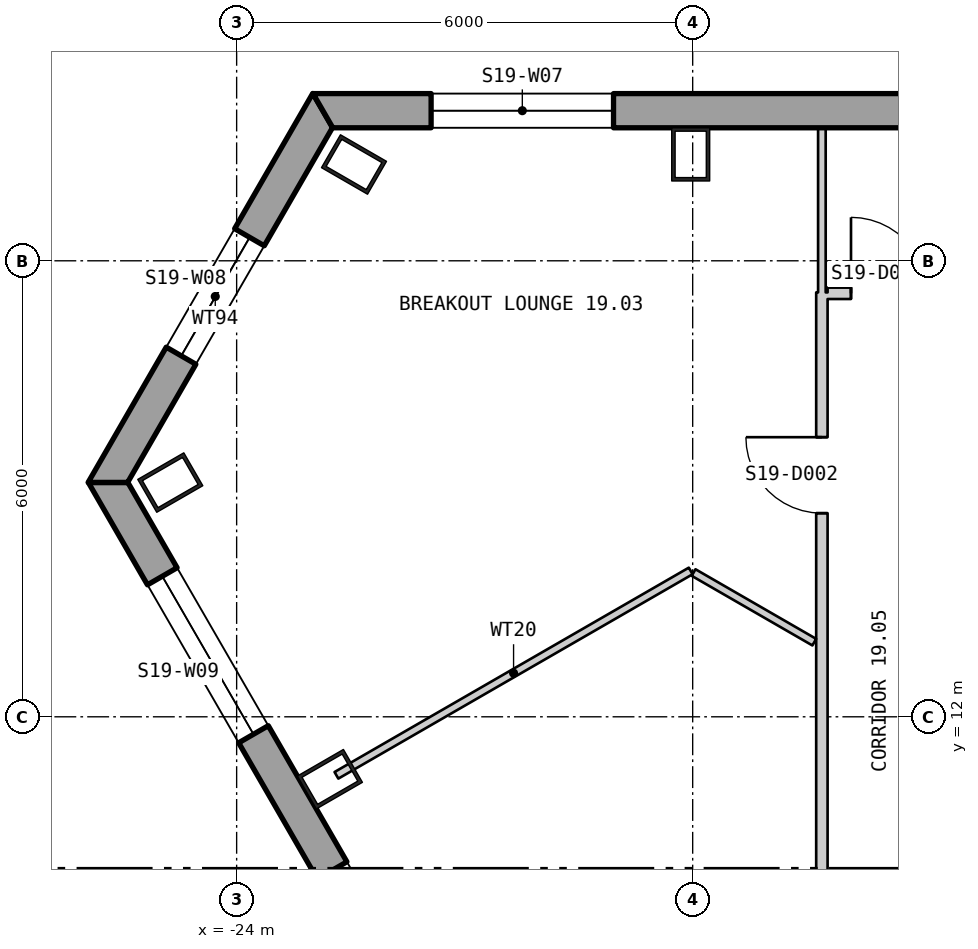
"""IFC4 building model, lengths in metres.
Left out: names, types, materials, properties, quantities, classifications, styles, units other than length and angle.
Written with IfcOpenShell. Run it as: python <this file> out.ifc"""

import sys

from ifc_helpers import new_model, si_unit, direction, frame, frame_2d, origin, origin_2d, place, context, subcontext, project, spatial, polyline, rectangle, hollow_rectangle, outline, extrude, element, fill, save


model = new_model("IFC4")
c1 = context("Model", 3, precision=1e-05, world=origin(), true_north=direction((0.0, 1.0)))
c2 = subcontext(c1, "Body", "Model", "MODEL_VIEW")
j1 = project(units=[si_unit("LENGTHUNIT", "METRE"), si_unit("PLANEANGLEUNIT", "RADIAN")], contexts=[c1])
p1 = place(None, origin())
s1 = spatial("IfcSite", under=j1, at=p1, CompositionType="ELEMENT")
p2 = place(p1, origin())
s2 = spatial("IfcBuilding", under=s1, at=p2, CompositionType="ELEMENT")
p3 = place(p2, frame((0.0, 0.0, 257.1)))
s3 = spatial("IfcBuildingStorey", under=s2, at=p3, CompositionType="ELEMENT", Elevation=257.1)
for number, where, z_axis, x_axis in (
    (1, (-18.026, 19.4, 0.0), (0.0, 0.0, 1.0), (-1.0, 0.0, 0.0)),
    (2, (-22.456, 19.267, 0.0), (0.0, 0.0, 1.0), (-0.5, -0.866, 0.0)),
    (3, (-24.873, 15.082, 0.0), (0.0, 0.0, 1.0), (0.5, -0.866, 0.0)),
    (4, (-22.773, 11.179, 0.0), (0.0, 0.0, 1.0), (0.5, -0.866, 0.0)),
):
    element("IfcColumn", number, at=place(p3, frame(where, z_axis=z_axis, x_axis=x_axis)), inside=s3, PredefinedType="COLUMN", context=c2, shape_type="SweptSolid", body=[
        extrude(hollow_rectangle(XDim=0.5, YDim=0.7, WallThickness=0.045, at=origin_2d()), origin(), (0.0, 0.0, 1.0), 3.9),
    ])
p4 = place(p3, frame((22.865, 19.975, -0.4), z_axis=(0.0, 0.0, 1.0), x_axis=(-1.0, 0.0, 0.0)))
e5 = element("IfcWall", 5, at=p4, inside=s3, PredefinedType="SOLIDWALL", context=c2, shape_type="SweptSolid", body=[
    extrude(outline(polyline([(-0.13, -0.225), (45.86, -0.225), (45.6, 0.225), (0.13, 0.225), (-0.13, -0.225)])), origin(), (0.0, 0.0, 1.0), 3.9),
])
p5 = place(p4, frame((1.424, 0.0, 1.3)))
e6 = element("IfcOpeningElement", 6, at=p5, cuts=e5, PredefinedType="OPENING", context=c2, shape_type="SweptSolid", body=[
    extrude(rectangle(XDim=2.4, YDim=2.0, at=frame_2d((1.2, 1.0))), frame((0.0, 0.235, 0.0), z_axis=(0.0, -1.0, 0.0), x_axis=(1.0, 0.0, 0.0)), (0.0, 0.0, 1.0), 0.47),
])
p6 = place(p4, frame((14.905, 0.0, 1.3)))
e7 = element("IfcOpeningElement", 7, at=p6, cuts=e5, PredefinedType="OPENING", context=c2, shape_type="SweptSolid", body=[
    extrude(rectangle(XDim=2.4, YDim=2.0, at=frame_2d((1.2, 1.0))), frame((0.0, 0.235, 0.0), z_axis=(0.0, -1.0, 0.0), x_axis=(1.0, 0.0, 0.0)), (0.0, 0.0, 1.0), 0.47),
])
p7 = place(p4, frame((19.412, 0.0, 1.3)))
e8 = element("IfcOpeningElement", 8, at=p7, cuts=e5, PredefinedType="OPENING", context=c2, shape_type="SweptSolid", body=[
    extrude(rectangle(XDim=2.4, YDim=2.0, at=frame_2d((1.2, 1.0))), frame((0.0, 0.235, 0.0), z_axis=(0.0, -1.0, 0.0), x_axis=(1.0, 0.0, 0.0)), (0.0, 0.0, 1.0), 0.47),
])
p8 = place(p4, frame((23.918, 0.0, 1.3)))
e9 = element("IfcOpeningElement", 9, at=p8, cuts=e5, PredefinedType="OPENING", context=c2, shape_type="SweptSolid", body=[
    extrude(rectangle(XDim=2.4, YDim=2.0, at=frame_2d((1.2, 1.0))), frame((0.0, 0.235, 0.0), z_axis=(0.0, -1.0, 0.0), x_axis=(1.0, 0.0, 0.0)), (0.0, 0.0, 1.0), 0.47),
])
p9 = place(p4, frame((28.425, 0.0, 1.3)))
e10 = element("IfcOpeningElement", 10, at=p9, cuts=e5, PredefinedType="OPENING", context=c2, shape_type="SweptSolid", body=[
    extrude(rectangle(XDim=2.4, YDim=2.0, at=frame_2d((1.2, 1.0))), frame((0.0, 0.235, 0.0), z_axis=(0.0, -1.0, 0.0), x_axis=(1.0, 0.0, 0.0)), (0.0, 0.0, 1.0), 0.47),
])
p10 = place(p4, frame((32.932, 0.0, 1.3)))
e11 = element("IfcOpeningElement", 11, at=p10, cuts=e5, PredefinedType="OPENING", context=c2, shape_type="SweptSolid", body=[
    extrude(rectangle(XDim=2.4, YDim=2.0, at=frame_2d((1.2, 1.0))), frame((0.0, 0.235, 0.0), z_axis=(0.0, -1.0, 0.0), x_axis=(1.0, 0.0, 0.0)), (0.0, 0.0, 1.0), 0.47),
])
p11 = place(p4, frame((41.907, 0.0, 1.3)))
e12 = element("IfcOpeningElement", 12, at=p11, cuts=e5, PredefinedType="OPENING", context=c2, shape_type="SweptSolid", body=[
    extrude(rectangle(XDim=2.4, YDim=2.0, at=frame_2d((1.2, 1.0))), frame((0.0, 0.235, 0.0), z_axis=(0.0, -1.0, 0.0), x_axis=(1.0, 0.0, 0.0)), (0.0, 0.0, 1.0), 0.47),
])
p12 = place(p3, frame((-22.869, 19.977, -0.4), z_axis=(0.0, 0.0, 1.0), x_axis=(-0.50000128263, -0.866024663256, 0.0)))
e13 = element("IfcWall", 13, at=p12, inside=s3, PredefinedType="SOLIDWALL", context=c2, shape_type="SweptSolid", body=[
    extrude(outline(polyline([(-0.13, -0.225), (5.78, -0.225), (5.52, 0.225), (0.13, 0.225), (-0.13, -0.225)])), origin(), (0.0, 0.0, 1.0), 3.9),
])
p13 = place(p12, frame((1.925, 0.0, 1.3)))
e14 = element("IfcOpeningElement", 14, at=p13, cuts=e13, PredefinedType="OPENING", context=c2, shape_type="SweptSolid", body=[
    extrude(rectangle(XDim=1.8, YDim=2.0, at=frame_2d((0.9, 1.0))), frame((0.0, 0.235, 0.0), z_axis=(0.0, -1.0, 0.0), x_axis=(1.0, 0.0, 0.0)), (0.0, 0.0, 1.0), 0.47),
])
p14 = place(p3, frame((-25.69, 15.082, -0.18), z_axis=(0.0, 0.0, 1.0), x_axis=(0.500000141277, -0.866025322218, 0.0)))
e15 = element("IfcWall", 15, at=p14, inside=s3, PredefinedType="SOLIDWALL", context=c2, shape_type="SweptSolid", body=[
    extrude(outline(polyline([(-0.13, -0.225), (45.86, -0.225), (45.6, 0.225), (0.13, 0.225), (-0.13, -0.225)])), origin(), (0.0, 0.0, 1.0), 3.68),
])
p15 = place(p14, frame((1.424, 0.0, 1.08)))
e16 = element("IfcOpeningElement", 16, at=p15, cuts=e15, PredefinedType="OPENING", context=c2, shape_type="SweptSolid", body=[
    extrude(rectangle(XDim=2.4, YDim=2.0, at=frame_2d((1.2, 1.0))), frame((0.0, 0.235, 0.0), z_axis=(0.0, -1.0, 0.0), x_axis=(1.0, 0.0, 0.0)), (0.0, 0.0, 1.0), 0.47),
])
p16 = place(p14, frame((5.892, 0.0, 1.08)))
e17 = element("IfcOpeningElement", 17, at=p16, cuts=e15, PredefinedType="OPENING", context=c2, shape_type="SweptSolid", body=[
    extrude(rectangle(XDim=2.4, YDim=2.0, at=frame_2d((1.2, 1.0))), frame((0.0, 0.235, 0.0), z_axis=(0.0, -1.0, 0.0), x_axis=(1.0, 0.0, 0.0)), (0.0, 0.0, 1.0), 0.47),
])
p17 = place(p14, frame((10.399, 0.0, 1.08)))
e18 = element("IfcOpeningElement", 18, at=p17, cuts=e15, PredefinedType="OPENING", context=c2, shape_type="SweptSolid", body=[
    extrude(rectangle(XDim=2.4, YDim=2.0, at=frame_2d((1.2, 1.0))), frame((0.0, 0.235, 0.0), z_axis=(0.0, -1.0, 0.0), x_axis=(1.0, 0.0, 0.0)), (0.0, 0.0, 1.0), 0.47),
])
p18 = place(p14, frame((14.905, 0.0, 1.08)))
e19 = element("IfcOpeningElement", 19, at=p18, cuts=e15, PredefinedType="OPENING", context=c2, shape_type="SweptSolid", body=[
    extrude(rectangle(XDim=2.4, YDim=2.0, at=frame_2d((1.2, 1.0))), frame((0.0, 0.235, 0.0), z_axis=(0.0, -1.0, 0.0), x_axis=(1.0, 0.0, 0.0)), (0.0, 0.0, 1.0), 0.47),
])
p19 = place(p14, frame((19.412, 0.0, 1.08)))
e20 = element("IfcOpeningElement", 20, at=p19, cuts=e15, PredefinedType="OPENING", context=c2, shape_type="SweptSolid", body=[
    extrude(rectangle(XDim=2.4, YDim=2.0, at=frame_2d((1.2, 1.0))), frame((0.0, 0.235, 0.0), z_axis=(0.0, -1.0, 0.0), x_axis=(1.0, 0.0, 0.0)), (0.0, 0.0, 1.0), 0.47),
])
p20 = place(p14, frame((23.918, 0.0, 1.08)))
e21 = element("IfcOpeningElement", 21, at=p20, cuts=e15, PredefinedType="OPENING", context=c2, shape_type="SweptSolid", body=[
    extrude(rectangle(XDim=2.4, YDim=2.0, at=frame_2d((1.2, 1.0))), frame((0.0, 0.235, 0.0), z_axis=(0.0, -1.0, 0.0), x_axis=(1.0, 0.0, 0.0)), (0.0, 0.0, 1.0), 0.47),
])
p21 = place(p14, frame((28.425, 0.0, 1.08)))
e22 = element("IfcOpeningElement", 22, at=p21, cuts=e15, PredefinedType="OPENING", context=c2, shape_type="SweptSolid", body=[
    extrude(rectangle(XDim=2.4, YDim=2.0, at=frame_2d((1.2, 1.0))), frame((0.0, 0.235, 0.0), z_axis=(0.0, -1.0, 0.0), x_axis=(1.0, 0.0, 0.0)), (0.0, 0.0, 1.0), 0.47),
])
p22 = place(p14, frame((32.932, 0.0, 1.08)))
e23 = element("IfcOpeningElement", 23, at=p22, cuts=e15, PredefinedType="OPENING", context=c2, shape_type="SweptSolid", body=[
    extrude(rectangle(XDim=2.4, YDim=2.0, at=frame_2d((1.2, 1.0))), frame((0.0, 0.235, 0.0), z_axis=(0.0, -1.0, 0.0), x_axis=(1.0, 0.0, 0.0)), (0.0, 0.0, 1.0), 0.47),
])
p23 = place(p14, frame((37.438, 0.0, 1.08)))
e24 = element("IfcOpeningElement", 24, at=p23, cuts=e15, PredefinedType="OPENING", context=c2, shape_type="SweptSolid", body=[
    extrude(rectangle(XDim=2.4, YDim=2.0, at=frame_2d((1.2, 1.0))), frame((0.0, 0.235, 0.0), z_axis=(0.0, -1.0, 0.0), x_axis=(1.0, 0.0, 0.0)), (0.0, 0.0, 1.0), 0.47),
])
p24 = place(p14, frame((41.907, 0.0, 1.08)))
e25 = element("IfcOpeningElement", 25, at=p24, cuts=e15, PredefinedType="OPENING", context=c2, shape_type="SweptSolid", body=[
    extrude(rectangle(XDim=2.4, YDim=2.0, at=frame_2d((1.2, 1.0))), frame((0.0, 0.235, 0.0), z_axis=(0.0, -1.0, 0.0), x_axis=(1.0, 0.0, 0.0)), (0.0, 0.0, 1.0), 0.47),
])
p25 = place(p3, frame((-22.687, 11.23, 0.0), z_axis=(0.0, 0.0, 1.0), x_axis=(0.866188679886, 0.499717090799, 0.0)))
e26 = element("IfcWall", 26, at=p25, inside=s3, PredefinedType="PARTITIONING", context=c2, shape_type="SweptSolid", body=[
    extrude(rectangle(XDim=5.381, YDim=0.1, at=frame_2d((2.691, 0.0))), origin(), (0.0, 0.0, 1.0), 3.7),
])
p26 = place(p3, frame((-17.988, 13.898, 0.0), z_axis=(0.0, 0.0, 1.0), x_axis=(0.866221908719, -0.499659488908, 0.0)))
e27 = element("IfcWall", 27, at=p26, inside=s3, PredefinedType="PARTITIONING", context=c2, shape_type="SweptSolid", body=[
    extrude(rectangle(XDim=1.833, YDim=0.1, at=frame_2d((0.917, 0.0))), origin(), (0.0, 0.0, 1.0), 3.7),
])
p27 = place(p3, frame((-16.3, 2.125, 0.0), z_axis=(0.0, 0.0, 1.0), x_axis=(0.0, 1.0, 0.0)))
e28 = element("IfcWall", 28, at=p27, inside=s3, PredefinedType="PARTITIONING", context=c2, shape_type="SweptSolid", body=[
    extrude(rectangle(XDim=15.459, YDim=0.15, at=frame_2d((7.729, 0.0))), origin(), (0.0, 0.0, 1.0), 3.7),
])
p28 = place(p27, frame((5.99, 0.0, 0.0)))
e29 = element("IfcOpeningElement", 29, at=p28, cuts=e28, PredefinedType="OPENING", context=c2, shape_type="SweptSolid", body=[
    extrude(rectangle(XDim=1.0, YDim=2.1, at=frame_2d((0.5, 1.05))), frame((0.0, 0.085, 0.0), z_axis=(0.0, -1.0, 0.0), x_axis=(1.0, 0.0, 0.0)), (0.0, 0.0, 1.0), 0.17),
])
p29 = place(p27, frame((12.554, 0.0, 0.0)))
e30 = element("IfcOpeningElement", 30, at=p29, cuts=e28, PredefinedType="OPENING", context=c2, shape_type="SweptSolid", body=[
    extrude(rectangle(XDim=1.0, YDim=2.1, at=frame_2d((0.5, 1.05))), frame((0.0, 0.085, 0.0), z_axis=(0.0, -1.0, 0.0), x_axis=(1.0, 0.0, 0.0)), (0.0, 0.0, 1.0), 0.17),
])
p30 = place(p3, frame((-16.3, 17.584, 0.0), z_axis=(0.0, 0.0, 1.0), x_axis=(0.0, 1.0, 0.0)))
e31 = element("IfcWall", 31, at=p30, inside=s3, PredefinedType="PARTITIONING", context=c2, shape_type="SweptSolid", body=[
    extrude(rectangle(XDim=2.166, YDim=0.1, at=frame_2d((1.083, 0.0))), origin(), (0.0, 0.0, 1.0), 3.7),
])
p31 = place(p3, frame((-16.225, 17.572, 0.0), z_axis=(0.0, 0.0, 1.0), x_axis=(1.0, 0.0, 0.0)))
e32 = element("IfcWall", 32, at=p31, inside=s3, PredefinedType="PARTITIONING", context=c2, shape_type="SweptSolid", body=[
    extrude(rectangle(XDim=1.725, YDim=0.15, at=frame_2d((0.863, 0.0))), origin(), (0.0, 0.0, 1.0), 3.7),
])
p32 = place(p31, frame((0.308, 0.0, 0.0)))
e33 = element("IfcOpeningElement", 33, at=p32, cuts=e32, PredefinedType="OPENING", context=c2, shape_type="SweptSolid", body=[
    extrude(rectangle(XDim=1.0, YDim=2.1, at=frame_2d((0.5, 1.05))), frame((0.0, 0.085, 0.0), z_axis=(0.0, -1.0, 0.0), x_axis=(1.0, 0.0, 0.0)), (0.0, 0.0, 1.0), 0.17),
])
p33 = place(p11, origin())
e34 = element("IfcWindow", 34, at=p33, inside=s3, PartitioningType="SINGLE_PANEL", PredefinedType="WINDOW", context=c2, shape_type="SweptSolid", body=[
    extrude(rectangle(XDim=2.4, YDim=2.0, at=frame_2d((1.2, 1.0))), frame((0.0, 0.105, 0.0), z_axis=(0.0, -1.0, 0.0), x_axis=(1.0, 0.0, 0.0)), (0.0, 0.0, 1.0), 0.06),
])
fill(e12, e34)
p34 = place(p13, origin())
e35 = element("IfcWindow", 35, at=p34, inside=s3, PartitioningType="SINGLE_PANEL", PredefinedType="WINDOW", context=c2, shape_type="SweptSolid", body=[
    extrude(rectangle(XDim=1.8, YDim=2.0, at=frame_2d((0.9, 1.0))), frame((0.0, 0.105, 0.0), z_axis=(0.0, -1.0, 0.0), x_axis=(1.0, 0.0, 0.0)), (0.0, 0.0, 1.0), 0.06),
])
fill(e14, e35)
p35 = place(p15, origin())
e36 = element("IfcWindow", 36, at=p35, inside=s3, PartitioningType="SINGLE_PANEL", PredefinedType="WINDOW", context=c2, shape_type="SweptSolid", body=[
    extrude(rectangle(XDim=2.4, YDim=2.0, at=frame_2d((1.2, 1.0))), frame((0.0, 0.105, 0.0), z_axis=(0.0, -1.0, 0.0), x_axis=(1.0, 0.0, 0.0)), (0.0, 0.0, 1.0), 0.06),
])
fill(e16, e36)
p36 = place(p16, origin())
e37 = element("IfcWindow", 37, at=p36, inside=s3, PartitioningType="SINGLE_PANEL", PredefinedType="WINDOW", context=c2, shape_type="SweptSolid", body=[
    extrude(rectangle(XDim=2.4, YDim=2.0, at=frame_2d((1.2, 1.0))), frame((0.0, 0.105, 0.0), z_axis=(0.0, -1.0, 0.0), x_axis=(1.0, 0.0, 0.0)), (0.0, 0.0, 1.0), 0.06),
])
fill(e17, e37)
p37 = place(p29, origin())
e38 = element("IfcDoor", 38, at=p37, inside=s3, OperationType="SINGLE_SWING_LEFT", PredefinedType="DOOR", context=c2, shape_type="SweptSolid", body=[
    extrude(rectangle(XDim=1.0, YDim=2.1, at=frame_2d((0.5, 1.05))), frame((0.0, 0.025, 0.0), z_axis=(0.0, -1.0, 0.0), x_axis=(1.0, 0.0, 0.0)), (0.0, 0.0, 1.0), 0.05),
])
fill(e30, e38)
p38 = place(p32, origin())
e39 = element("IfcDoor", 39, at=p38, inside=s3, OperationType="SINGLE_SWING_RIGHT", PredefinedType="DOOR", context=c2, shape_type="SweptSolid", body=[
    extrude(rectangle(XDim=1.0, YDim=2.1, at=frame_2d((0.5, 1.05))), frame((0.0, 0.025, 0.0), z_axis=(0.0, -1.0, 0.0), x_axis=(1.0, 0.0, 0.0)), (0.0, 0.0, 1.0), 0.05),
])
fill(e33, e39)
save(model, sys.argv[1])
